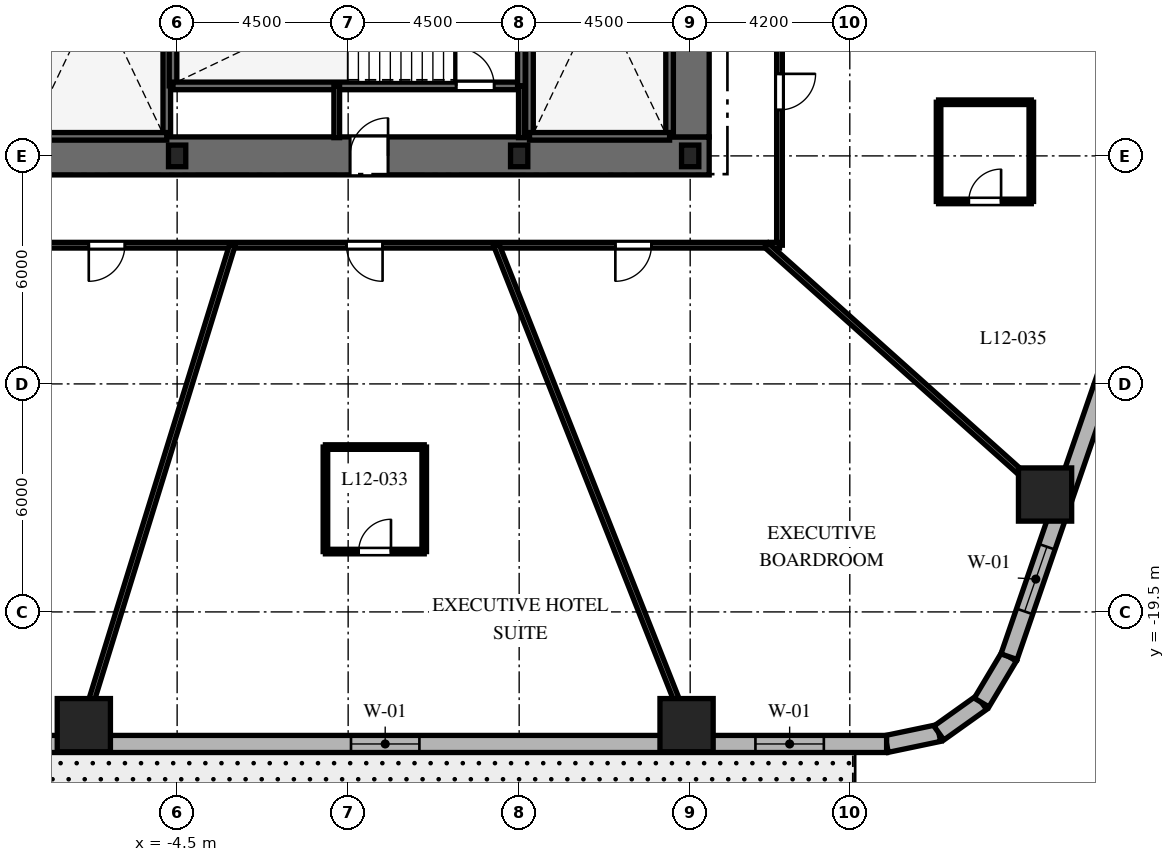
"""IFC4 building model, lengths in metres.
Left out: names, types, materials, properties, quantities, classifications, styles, units other than length and angle.
Written with IfcOpenShell. Run it as: python <this file> out.ifc"""

import sys

from ifc_helpers import new_model, si_unit, direction, frame, frame_2d, origin, origin_2d, place, context, subcontext, project, spatial, rectangle, i_section, extrude, element, fill, save


model = new_model("IFC4")
c1 = context("Model", 3, precision=1e-05, world=origin(), true_north=direction((0.0, 1.0)))
c2 = subcontext(c1, "Body", "Model", "MODEL_VIEW")
j1 = project(units=[si_unit("LENGTHUNIT", "METRE"), si_unit("PLANEANGLEUNIT", "RADIAN")], contexts=[c1])
p1 = place(None, origin())
s1 = spatial("IfcSite", under=j1, at=p1, CompositionType="ELEMENT")
p2 = place(p1, origin())
s2 = spatial("IfcBuilding", under=s1, at=p2, CompositionType="ELEMENT")
p3 = place(p2, frame((0.0, 0.0, 56.4)))
s3 = spatial("IfcBuildingStorey", under=s2, at=p3, CompositionType="ELEMENT", Elevation=56.4)
p4 = place(p3, frame((-9.5, -7.5, 0.0), z_axis=(0.0, 0.0, 1.0), x_axis=(1.0, 0.0, 0.0)))
e1 = element("IfcWall", 1, at=p4, inside=s3, PredefinedType="SHEAR", context=c2, shape_type="SweptSolid", body=[
    extrude(rectangle(XDim=19.0, YDim=1.0, at=frame_2d((9.5, 0.0))), origin(), (0.0, 0.0, 1.0), 3.7),
])
p5 = place(p4, frame((9.55, 0.0, 0.0)))
e2 = element("IfcOpeningElement", 2, at=p5, cuts=e1, PredefinedType="OPENING", context=c2, shape_type="SweptSolid", body=[
    extrude(rectangle(XDim=1.0, YDim=2.15, at=frame_2d((0.5, 1.075))), frame((0.0, 0.51, 0.0), z_axis=(0.0, -1.0, 0.0), x_axis=(1.0, 0.0, 0.0)), (0.0, 0.0, 1.0), 1.02),
])
p6 = place(p3, frame((9.0, -7.0, 0.0), z_axis=(0.0, 0.0, 1.0), x_axis=(0.0, 1.0, 0.0)))
e3 = element("IfcWall", 3, at=p6, inside=s3, PredefinedType="SHEAR", context=c2, shape_type="SweptSolid", body=[
    extrude(rectangle(XDim=14.0, YDim=1.0, at=frame_2d((7.0, 0.0))), origin(), (0.0, 0.0, 1.0), 3.7),
])
p7 = place(p6, frame((10.125, 0.0, 0.0)))
e4 = element("IfcOpeningElement", 4, at=p7, cuts=e3, PredefinedType="OPENING", context=c2, shape_type="SweptSolid", body=[
    extrude(rectangle(XDim=1.05, YDim=2.15, at=frame_2d((0.525, 1.075))), frame((0.0, 0.51, 0.0), z_axis=(0.0, -1.0, 0.0), x_axis=(1.0, 0.0, 0.0)), (0.0, 0.0, 1.0), 1.02),
])
p8 = place(p3, frame((-4.772, -6.985, 0.0), z_axis=(0.0, 0.0, 1.0), x_axis=(0.0, 1.0, 0.0)))
e5 = element("IfcWall", 5, at=p8, inside=s3, PredefinedType="SHEAR", context=c2, shape_type="SweptSolid", body=[
    extrude(rectangle(XDim=9.143, YDim=0.2, at=frame_2d((4.572, 0.0))), origin(), (0.0, 0.0, 1.0), 3.7),
])
p9 = place(p3, frame((-8.458, -6.985, 0.0), z_axis=(0.0, 0.0, 1.0), x_axis=(1.0, 0.0, 0.0)))
e6 = element("IfcWall", 6, at=p9, inside=s3, PredefinedType="SHEAR", context=c2, shape_type="SweptSolid", body=[
    extrude(rectangle(XDim=3.686, YDim=0.2, at=frame_2d((1.843, 0.0))), origin(), (0.0, 0.0, 1.0), 3.7),
])
for number, where, z_axis, x_axis in (
    (7, (4.772, -6.985, 0.0), (0.0, 0.0, 1.0), (0.0, 1.0, 0.0)),
    (8, (8.458, -6.985, 0.0), (0.0, 0.0, 1.0), (0.0, 1.0, 0.0)),
):
    element("IfcWall", number, at=place(p3, frame(where, z_axis=z_axis, x_axis=x_axis)), inside=s3, PredefinedType="SHEAR", context=c2, shape_type="SweptSolid", body=[
        extrude(rectangle(XDim=9.143, YDim=0.2, at=frame_2d((4.572, 0.0))), origin(), (0.0, 0.0, 1.0), 3.7),
    ])
for number, where, z_axis, x_axis in (
    (9, (4.772, -6.985, 0.0), (0.0, 0.0, 1.0), (1.0, 0.0, 0.0)),
    (10, (-4.608, -5.658, 0.0), (0.0, 0.0, 1.0), (0.0, 1.0, 0.0)),
):
    element("IfcWall", number, at=place(p3, frame(where, z_axis=z_axis, x_axis=x_axis)), inside=s3, PredefinedType="SHEAR", context=c2, shape_type="SweptSolid", body=[
        extrude(rectangle(XDim=3.686, YDim=0.2, at=frame_2d((1.843, 0.0))), origin(), (0.0, 0.0, 1.0), 3.7),
    ])
p10 = place(p3, frame((-4.608, -5.658, 0.0), z_axis=(0.0, 0.0, 1.0), x_axis=(1.0, 0.0, 0.0)))
e11 = element("IfcWall", 11, at=p10, inside=s3, PredefinedType="SHEAR", context=c2, shape_type="SweptSolid", body=[
    extrude(rectangle(XDim=9.166, YDim=0.2, at=frame_2d((4.583, 0.0))), origin(), (0.0, 0.0, 1.0), 3.7),
])
p11 = place(p10, frame((7.45, 0.0, 0.0)))
e12 = element("IfcOpeningElement", 12, at=p11, cuts=e11, PredefinedType="OPENING", context=c2, shape_type="SweptSolid", body=[
    extrude(rectangle(XDim=1.0, YDim=2.15, at=frame_2d((0.5, 1.075))), frame((0.0, 0.11, 0.0), z_axis=(0.0, -1.0, 0.0), x_axis=(1.0, 0.0, 0.0)), (0.0, 0.0, 1.0), 0.22),
])
p12 = place(p3, frame((4.558, -5.658, 0.0), z_axis=(0.0, 0.0, 1.0), x_axis=(0.0, 1.0, 0.0)))
e13 = element("IfcWall", 13, at=p12, inside=s3, PredefinedType="SHEAR", context=c2, shape_type="SweptSolid", body=[
    extrude(rectangle(XDim=3.686, YDim=0.2, at=frame_2d((1.843, 0.0))), origin(), (0.0, 0.0, 1.0), 3.7),
])
for number, where, z_axis, x_axis in (
    (14, (-4.5, -7.5, 0.0), (0.0, 0.0, 1.0), (1.0, 0.0, 0.0)),
    (15, (4.5, -7.5, 0.0), (0.0, 0.0, 1.0), (1.0, 0.0, 0.0)),
    (16, (9.0, -7.5, 0.0), (0.0, 0.0, 1.0), (1.0, 0.0, 0.0)),
):
    element("IfcColumn", number, at=place(p3, frame(where, z_axis=z_axis, x_axis=x_axis)), inside=s3, PredefinedType="COLUMN", context=c2, shape_type="SweptSolid", body=[
        extrude(i_section(OverallWidth=0.454, OverallDepth=0.569, WebThickness=0.078, FlangeThickness=0.125, at=origin_2d()), origin(), (0.0, 0.0, 1.0), 3.7),
    ])
for number, where, z_axis, x_axis in (
    (17, (-6.955, -22.48, 0.0), (0.0, 0.0, 1.0), (1.0, 0.0, 0.0)),
    (18, (8.905, -22.48, 0.0), (0.0, 0.0, 1.0), (1.0, 0.0, 0.0)),
    (19, (18.338, -16.411, 0.0), (0.0, 0.0, 1.0), (1.0, 0.0, 0.0)),
):
    element("IfcColumn", number, at=place(p3, frame(where, z_axis=z_axis, x_axis=x_axis)), inside=s3, PredefinedType="COLUMN", context=c2, shape_type="SweptSolid", body=[
        extrude(rectangle(XDim=1.4, YDim=1.4, at=origin_2d()), origin(), (0.0, 0.0, 1.0), 3.7),
    ])
p13 = place(p3, frame((14.168, -22.975, 0.0), z_axis=(0.0, 0.0, 1.0), x_axis=(0.978770371074, 0.204959900243, 0.0)))
e20 = element("IfcWall", 20, at=p13, inside=s3, PredefinedType="SOLIDWALL", context=c2, shape_type="SweptSolid", body=[
    extrude(rectangle(XDim=1.406, YDim=0.45, at=frame_2d((0.703, 0.0))), origin(), (0.0, 0.0, 1.0), 3.4),
])
p14 = place(p3, frame((15.544, -22.687, 0.0), z_axis=(0.0, 0.0, 1.0), x_axis=(0.814210854316, 0.580569276412, 0.0)))
e21 = element("IfcWall", 21, at=p14, inside=s3, PredefinedType="SOLIDWALL", context=c2, shape_type="SweptSolid", body=[
    extrude(rectangle(XDim=1.381, YDim=0.45, at=frame_2d((0.691, 0.0))), origin(), (0.0, 0.0, 1.0), 3.4),
])
p15 = place(p3, frame((16.669, -21.885, 0.0), z_axis=(0.0, 0.0, 1.0), x_axis=(0.512936712947, 0.858426425799, 0.0)))
e22 = element("IfcWall", 22, at=p15, inside=s3, PredefinedType="SOLIDWALL", context=c2, shape_type="SweptSolid", body=[
    extrude(rectangle(XDim=1.406, YDim=0.45, at=frame_2d((0.703, 0.0))), origin(), (0.0, 0.0, 1.0), 3.4),
])
p16 = place(p3, frame((-12.221, -22.975, 0.0), z_axis=(0.0, 0.0, 1.0), x_axis=(1.0, 0.0, 0.0)))
e23 = element("IfcWall", 23, at=p16, inside=s3, PredefinedType="SOLIDWALL", context=c2, shape_type="SweptSolid", body=[
    extrude(rectangle(XDim=26.389, YDim=0.45, at=frame_2d((13.195, 0.0))), origin(), (0.0, 0.0, 1.0), 3.4),
])
p17 = place(p16, frame((2.799, 0.0, 0.0)))
e24 = element("IfcOpeningElement", 24, at=p17, cuts=e23, PredefinedType="OPENING", context=c2, shape_type="SweptSolid", body=[
    extrude(rectangle(XDim=1.0, YDim=2.15, at=frame_2d((0.5, 1.075))), frame((0.0, 0.235, 0.0), z_axis=(0.0, -1.0, 0.0), x_axis=(1.0, 0.0, 0.0)), (0.0, 0.0, 1.0), 0.47),
])
p18 = place(p16, frame((12.296, 0.0, 0.8)))
e25 = element("IfcOpeningElement", 25, at=p18, cuts=e23, PredefinedType="OPENING", context=c2, shape_type="SweptSolid", body=[
    extrude(rectangle(XDim=1.8, YDim=1.8, at=frame_2d((0.9, 0.9))), frame((0.0, 0.235, 0.0), z_axis=(0.0, -1.0, 0.0), x_axis=(1.0, 0.0, 0.0)), (0.0, 0.0, 1.0), 0.47),
])
p19 = place(p16, frame((22.938, 0.0, 0.8)))
e26 = element("IfcOpeningElement", 26, at=p19, cuts=e23, PredefinedType="OPENING", context=c2, shape_type="SweptSolid", body=[
    extrude(rectangle(XDim=1.8, YDim=1.8, at=frame_2d((0.9, 0.9))), frame((0.0, 0.235, 0.0), z_axis=(0.0, -1.0, 0.0), x_axis=(1.0, 0.0, 0.0)), (0.0, 0.0, 1.0), 0.47),
])
p20 = place(p3, frame((17.39, -20.678, 0.0), z_axis=(0.0, 0.0, 1.0), x_axis=(0.326068018294, 0.945346310854, 0.0)))
e27 = element("IfcWall", 27, at=p20, inside=s3, PredefinedType="SOLIDWALL", context=c2, shape_type="SweptSolid", body=[
    extrude(rectangle(XDim=21.793, YDim=0.45, at=frame_2d((10.896, 0.0))), origin(), (0.0, 0.0, 1.0), 3.4),
])
p21 = place(p20, frame((1.26, 0.0, 0.8)))
e28 = element("IfcOpeningElement", 28, at=p21, cuts=e27, PredefinedType="OPENING", context=c2, shape_type="SweptSolid", body=[
    extrude(rectangle(XDim=1.8, YDim=1.8, at=frame_2d((0.9, 0.9))), frame((0.0, 0.235, 0.0), z_axis=(0.0, -1.0, 0.0), x_axis=(1.0, 0.0, 0.0)), (0.0, 0.0, 1.0), 0.47),
])
p22 = place(p20, frame((9.943, 0.0, 0.8)))
e29 = element("IfcOpeningElement", 29, at=p22, cuts=e27, PredefinedType="OPENING", context=c2, shape_type="SweptSolid", body=[
    extrude(rectangle(XDim=1.8, YDim=1.8, at=frame_2d((0.9, 0.9))), frame((0.0, 0.235, 0.0), z_axis=(0.0, -1.0, 0.0), x_axis=(1.0, 0.0, 0.0)), (0.0, 0.0, 1.0), 0.47),
])
p23 = place(p20, frame((18.68, 0.0, 0.8)))
e30 = element("IfcOpeningElement", 30, at=p23, cuts=e27, PredefinedType="OPENING", context=c2, shape_type="SweptSolid", body=[
    extrude(rectangle(XDim=1.8, YDim=1.8, at=frame_2d((0.9, 0.9))), frame((0.0, 0.235, 0.0), z_axis=(0.0, -1.0, 0.0), x_axis=(1.0, 0.0, 0.0)), (0.0, 0.0, 1.0), 0.47),
])
for number, where, z_axis, x_axis in (
    (31, (-0.3, -7.02, 0.0), (0.0, 0.0, 1.0), (0.0, 1.0, 0.0)),
    (32, (4.558, -7.02, 0.0), (0.0, 0.0, 1.0), (0.0, 1.0, 0.0)),
):
    element("IfcWall", number, at=place(p3, frame(where, z_axis=z_axis, x_axis=x_axis)), inside=s3, PredefinedType="PARTITIONING", context=c2, shape_type="SweptSolid", body=[
        extrude(rectangle(XDim=1.362, YDim=0.15, at=frame_2d((0.681, 0.0))), origin(), (0.0, 0.0, 1.0), 3.4),
    ])
p24 = place(p3, frame((11.35, 9.85, 0.0), z_axis=(0.0, 0.0, 1.0), x_axis=(0.0, -1.0, 0.0)))
e33 = element("IfcWall", 33, at=p24, inside=s3, PredefinedType="PARTITIONING", context=c2, shape_type="SweptSolid", body=[
    extrude(rectangle(XDim=19.7, YDim=0.15, at=frame_2d((9.85, 0.0))), origin(), (0.0, 0.0, 1.0), 2.84),
])
p25 = place(p24, frame((4.704, 0.0, 0.0)))
e34 = element("IfcOpeningElement", 34, at=p25, cuts=e33, PredefinedType="OPENING", context=c2, shape_type="SweptSolid", body=[
    extrude(rectangle(XDim=0.95, YDim=2.03, at=frame_2d((0.475, 1.015))), frame((0.0, 0.085, 0.0), z_axis=(0.0, -1.0, 0.0), x_axis=(1.0, 0.0, 0.0)), (0.0, 0.0, 1.0), 0.17),
])
p26 = place(p24, frame((1.462, 0.0, 0.0)))
e35 = element("IfcOpeningElement", 35, at=p26, cuts=e33, PredefinedType="OPENING", context=c2, shape_type="SweptSolid", body=[
    extrude(rectangle(XDim=0.95, YDim=2.03, at=frame_2d((0.475, 1.015))), frame((0.0, 0.085, 0.0), z_axis=(0.0, -1.0, 0.0), x_axis=(1.0, 0.0, 0.0)), (0.0, 0.0, 1.0), 0.17),
])
p27 = place(p24, frame((15.191, 0.0, 0.0)))
e36 = element("IfcOpeningElement", 36, at=p27, cuts=e33, PredefinedType="OPENING", context=c2, shape_type="SweptSolid", body=[
    extrude(rectangle(XDim=0.95, YDim=2.03, at=frame_2d((0.475, 1.015))), frame((0.0, 0.085, 0.0), z_axis=(0.0, -1.0, 0.0), x_axis=(1.0, 0.0, 0.0)), (0.0, 0.0, 1.0), 0.17),
])
p28 = place(p24, frame((8.838, 0.0, 0.0)))
e37 = element("IfcOpeningElement", 37, at=p28, cuts=e33, PredefinedType="OPENING", context=c2, shape_type="SweptSolid", body=[
    extrude(rectangle(XDim=0.95, YDim=2.03, at=frame_2d((0.475, 1.015))), frame((0.0, 0.085, 0.0), z_axis=(0.0, -1.0, 0.0), x_axis=(1.0, 0.0, 0.0)), (0.0, 0.0, 1.0), 0.17),
])
p29 = place(p3, frame((11.35, -9.85, 0.0), z_axis=(0.0, 0.0, 1.0), x_axis=(-1.0, 0.0, 0.0)))
e38 = element("IfcWall", 38, at=p29, inside=s3, PredefinedType="PARTITIONING", context=c2, shape_type="SweptSolid", body=[
    extrude(rectangle(XDim=22.7, YDim=0.15, at=frame_2d((11.35, 0.0))), origin(), (0.0, 0.0, 1.0), 2.84),
])
p30 = place(p29, frame((17.225, 0.0, 0.0)))
e39 = element("IfcOpeningElement", 39, at=p30, cuts=e38, PredefinedType="OPENING", context=c2, shape_type="SweptSolid", body=[
    extrude(rectangle(XDim=0.95, YDim=2.03, at=frame_2d((0.475, 1.015))), frame((0.0, 0.085, 0.0), z_axis=(0.0, -1.0, 0.0), x_axis=(1.0, 0.0, 0.0)), (0.0, 0.0, 1.0), 0.17),
])
p31 = place(p29, frame((10.444, 0.0, 0.0)))
e40 = element("IfcOpeningElement", 40, at=p31, cuts=e38, PredefinedType="OPENING", context=c2, shape_type="SweptSolid", body=[
    extrude(rectangle(XDim=0.95, YDim=2.03, at=frame_2d((0.475, 1.015))), frame((0.0, 0.085, 0.0), z_axis=(0.0, -1.0, 0.0), x_axis=(1.0, 0.0, 0.0)), (0.0, 0.0, 1.0), 0.17),
])
p32 = place(p29, frame((3.369, 0.0, 0.0)))
e41 = element("IfcOpeningElement", 41, at=p32, cuts=e38, PredefinedType="OPENING", context=c2, shape_type="SweptSolid", body=[
    extrude(rectangle(XDim=0.95, YDim=2.03, at=frame_2d((0.475, 1.015))), frame((0.0, 0.085, 0.0), z_axis=(0.0, -1.0, 0.0), x_axis=(1.0, 0.0, 0.0)), (0.0, 0.0, 1.0), 0.17),
])
p33 = place(p3, frame((-3.048, -9.85, 0.0), z_axis=(0.0, 0.0, 1.0), x_axis=(-0.295553992761, -0.955326037206, 0.0)))
e42 = element("IfcWall", 42, at=p33, inside=s3, PredefinedType="PARTITIONING", context=c2, shape_type="SweptSolid", body=[
    extrude(rectangle(XDim=13.739, YDim=0.15, at=frame_2d((6.869, 0.0))), origin(), (0.0, 0.0, 1.0), 2.54),
])
p34 = place(p3, frame((3.902, -9.85, 0.0), z_axis=(0.0, 0.0, 1.0), x_axis=(0.36828765711, -0.929711891728, 0.0)))
e43 = element("IfcWall", 43, at=p34, inside=s3, PredefinedType="PARTITIONING", context=c2, shape_type="SweptSolid", body=[
    extrude(rectangle(XDim=14.117, YDim=0.15, at=frame_2d((7.059, 0.0))), origin(), (0.0, 0.0, 1.0), 2.54),
])
p35 = place(p3, frame((11.007, -9.85, 0.0), z_axis=(0.0, 0.0, 1.0), x_axis=(0.745177305978, -0.666866390407, 0.0)))
e44 = element("IfcWall", 44, at=p35, inside=s3, PredefinedType="PARTITIONING", context=c2, shape_type="SweptSolid", body=[
    extrude(rectangle(XDim=10.375, YDim=0.15, at=frame_2d((5.188, 0.0))), origin(), (0.0, 0.0, 1.0), 2.54),
])
p36 = place(p3, frame((-0.598, -17.912, 0.0), z_axis=(0.0, 0.0, 1.0), x_axis=(1.0, 0.0, 0.0)))
e45 = element("IfcWall", 45, at=p36, inside=s3, PredefinedType="PARTITIONING", context=c2, shape_type="SweptSolid", body=[
    extrude(rectangle(XDim=2.6, YDim=0.12, at=frame_2d((1.3, 0.0))), origin(), (0.0, 0.0, 1.0), 3.4),
])
p37 = place(p36, frame((0.875, 0.0, 0.0)))
e46 = element("IfcOpeningElement", 46, at=p37, cuts=e45, PredefinedType="OPENING", context=c2, shape_type="SweptSolid", body=[
    extrude(rectangle(XDim=0.85, YDim=2.03, at=frame_2d((0.425, 1.015))), frame((0.0, 0.07, 0.0), z_axis=(0.0, -1.0, 0.0), x_axis=(1.0, 0.0, 0.0)), (0.0, 0.0, 1.0), 0.14),
])
p38 = place(p3, frame((2.002, -17.912, 0.0), z_axis=(0.0, 0.0, 1.0), x_axis=(0.0, 1.0, 0.0)))
e47 = element("IfcWall", 47, at=p38, inside=s3, PredefinedType="PARTITIONING", context=c2, shape_type="SweptSolid", body=[
    extrude(rectangle(XDim=2.75, YDim=0.12, at=frame_2d((1.375, 0.0))), origin(), (0.0, 0.0, 1.0), 2.841),
])
p39 = place(p3, frame((2.002, -15.162, 0.0), z_axis=(0.0, 0.0, 1.0), x_axis=(-1.0, 0.0, 0.0)))
e48 = element("IfcWall", 48, at=p39, inside=s3, PredefinedType="PARTITIONING", context=c2, shape_type="SweptSolid", body=[
    extrude(rectangle(XDim=2.6, YDim=0.12, at=frame_2d((1.3, 0.0))), origin(), (0.0, 0.0, 1.0), 3.4),
])
p40 = place(p3, frame((-0.598, -15.162, 0.0), z_axis=(0.0, 0.0, 1.0), x_axis=(0.0, -1.0, 0.0)))
e49 = element("IfcWall", 49, at=p40, inside=s3, PredefinedType="PARTITIONING", context=c2, shape_type="SweptSolid", body=[
    extrude(rectangle(XDim=2.75, YDim=0.12, at=frame_2d((1.375, 0.0))), origin(), (0.0, 0.0, 1.0), 2.841),
])
p41 = place(p3, frame((15.536, -8.698, 0.0), z_axis=(0.0, 0.0, 1.0), x_axis=(1.0, 0.0, 0.0)))
e50 = element("IfcWall", 50, at=p41, inside=s3, PredefinedType="PARTITIONING", context=c2, shape_type="SweptSolid", body=[
    extrude(rectangle(XDim=2.44, YDim=0.12, at=frame_2d((1.22, 0.0))), origin(), (0.0, 0.0, 1.0), 2.972),
])
p42 = place(p41, frame((0.795, 0.0, 0.0)))
e51 = element("IfcOpeningElement", 51, at=p42, cuts=e50, PredefinedType="OPENING", context=c2, shape_type="SweptSolid", body=[
    extrude(rectangle(XDim=0.85, YDim=2.03, at=frame_2d((0.425, 1.015))), frame((0.0, 0.07, 0.0), z_axis=(0.0, -1.0, 0.0), x_axis=(1.0, 0.0, 0.0)), (0.0, 0.0, 1.0), 0.14),
])
p43 = place(p3, frame((17.976, -8.698, 0.0), z_axis=(0.0, 0.0, 1.0), x_axis=(0.0, 1.0, 0.0)))
e52 = element("IfcWall", 52, at=p43, inside=s3, PredefinedType="PARTITIONING", context=c2, shape_type="SweptSolid", body=[
    extrude(rectangle(XDim=2.61, YDim=0.12, at=frame_2d((1.305, 0.0))), origin(), (0.0, 0.0, 1.0), 2.972),
])
p44 = place(p3, frame((17.976, -6.088, 0.0), z_axis=(0.0, 0.0, 1.0), x_axis=(-1.0, 0.0, 0.0)))
e53 = element("IfcWall", 53, at=p44, inside=s3, PredefinedType="PARTITIONING", context=c2, shape_type="SweptSolid", body=[
    extrude(rectangle(XDim=2.44, YDim=0.12, at=frame_2d((1.22, 0.0))), origin(), (0.0, 0.0, 1.0), 2.972),
])
p45 = place(p3, frame((15.536, -6.088, 0.0), z_axis=(0.0, 0.0, 1.0), x_axis=(0.0, -1.0, 0.0)))
e54 = element("IfcWall", 54, at=p45, inside=s3, PredefinedType="PARTITIONING", context=c2, shape_type="SweptSolid", body=[
    extrude(rectangle(XDim=2.61, YDim=0.12, at=frame_2d((1.305, 0.0))), origin(), (0.0, 0.0, 1.0), 3.4),
])
p46 = place(p18, origin())
e55 = element("IfcWindow", 55, at=p46, inside=s3, PartitioningType="SINGLE_PANEL", PredefinedType="WINDOW", context=c2, shape_type="SweptSolid", body=[
    extrude(rectangle(XDim=1.8, YDim=1.8, at=frame_2d((0.9, 0.9))), frame((0.0, 0.03, 0.0), z_axis=(0.0, -1.0, 0.0), x_axis=(1.0, 0.0, 0.0)), (0.0, 0.0, 1.0), 0.06),
])
fill(e25, e55)
p47 = place(p19, origin())
e56 = element("IfcWindow", 56, at=p47, inside=s3, PartitioningType="SINGLE_PANEL", PredefinedType="WINDOW", context=c2, shape_type="SweptSolid", body=[
    extrude(rectangle(XDim=1.8, YDim=1.8, at=frame_2d((0.9, 0.9))), frame((0.0, 0.03, 0.0), z_axis=(0.0, -1.0, 0.0), x_axis=(1.0, 0.0, 0.0)), (0.0, 0.0, 1.0), 0.06),
])
fill(e26, e56)
p48 = place(p21, origin())
e57 = element("IfcWindow", 57, at=p48, inside=s3, PartitioningType="SINGLE_PANEL", PredefinedType="WINDOW", context=c2, shape_type="SweptSolid", body=[
    extrude(rectangle(XDim=1.8, YDim=1.8, at=frame_2d((0.9, 0.9))), frame((0.0, 0.03, 0.0), z_axis=(0.0, -1.0, 0.0), x_axis=(1.0, 0.0, 0.0)), (0.0, 0.0, 1.0), 0.06),
])
fill(e28, e57)
p49 = place(p11, origin())
e58 = element("IfcDoor", 58, at=p49, inside=s3, OperationType="SINGLE_SWING_LEFT", PredefinedType="DOOR", context=c2, shape_type="SweptSolid", body=[
    extrude(rectangle(XDim=1.0, YDim=2.15, at=frame_2d((0.5, 1.075))), frame((0.0, 0.025, 0.0), z_axis=(0.0, -1.0, 0.0), x_axis=(1.0, 0.0, 0.0)), (0.0, 0.0, 1.0), 0.05),
])
fill(e12, e58)
p50 = place(p5, origin())
e59 = element("IfcDoor", 59, at=p50, inside=s3, OperationType="SINGLE_SWING_RIGHT", PredefinedType="DOOR", context=c2, shape_type="SweptSolid", body=[
    extrude(rectangle(XDim=1.0, YDim=2.15, at=frame_2d((0.5, 1.075))), frame((0.0, 0.025, 0.0), z_axis=(0.0, -1.0, 0.0), x_axis=(1.0, 0.0, 0.0)), (0.0, 0.0, 1.0), 0.05),
])
fill(e2, e59)
p51 = place(p30, origin())
e60 = element("IfcDoor", 60, at=p51, inside=s3, OperationType="SINGLE_SWING_RIGHT", PredefinedType="DOOR", context=c2, shape_type="SweptSolid", body=[
    extrude(rectangle(XDim=0.95, YDim=2.03, at=frame_2d((0.475, 1.015))), frame((0.0, 0.025, 0.0), z_axis=(0.0, -1.0, 0.0), x_axis=(1.0, 0.0, 0.0)), (0.0, 0.0, 1.0), 0.05),
])
fill(e39, e60)
p52 = place(p31, origin())
e61 = element("IfcDoor", 61, at=p52, inside=s3, OperationType="SINGLE_SWING_LEFT", PredefinedType="DOOR", context=c2, shape_type="SweptSolid", body=[
    extrude(rectangle(XDim=0.95, YDim=2.03, at=frame_2d((0.475, 1.015))), frame((0.0, 0.025, 0.0), z_axis=(0.0, -1.0, 0.0), x_axis=(1.0, 0.0, 0.0)), (0.0, 0.0, 1.0), 0.05),
])
fill(e40, e61)
p53 = place(p37, origin())
e62 = element("IfcDoor", 62, at=p53, inside=s3, OperationType="SINGLE_SWING_RIGHT", PredefinedType="DOOR", context=c2, shape_type="SweptSolid", body=[
    extrude(rectangle(XDim=0.85, YDim=2.03, at=frame_2d((0.425, 1.015))), frame((0.0, 0.025, 0.0), z_axis=(0.0, -1.0, 0.0), x_axis=(1.0, 0.0, 0.0)), (0.0, 0.0, 1.0), 0.05),
])
fill(e46, e62)
p54 = place(p32, origin())
e63 = element("IfcDoor", 63, at=p54, inside=s3, OperationType="SINGLE_SWING_RIGHT", PredefinedType="DOOR", context=c2, shape_type="SweptSolid", body=[
    extrude(rectangle(XDim=0.95, YDim=2.03, at=frame_2d((0.475, 1.015))), frame((0.0, 0.025, 0.0), z_axis=(0.0, -1.0, 0.0), x_axis=(1.0, 0.0, 0.0)), (0.0, 0.0, 1.0), 0.05),
])
fill(e41, e63)
p55 = place(p27, origin())
e64 = element("IfcDoor", 64, at=p55, inside=s3, OperationType="SINGLE_SWING_LEFT", PredefinedType="DOOR", context=c2, shape_type="SweptSolid", body=[
    extrude(rectangle(XDim=0.95, YDim=2.03, at=frame_2d((0.475, 1.015))), frame((0.0, 0.025, 0.0), z_axis=(0.0, -1.0, 0.0), x_axis=(1.0, 0.0, 0.0)), (0.0, 0.0, 1.0), 0.05),
])
fill(e36, e64)
p56 = place(p42, origin())
e65 = element("IfcDoor", 65, at=p56, inside=s3, OperationType="SINGLE_SWING_RIGHT", PredefinedType="DOOR", context=c2, shape_type="SweptSolid", body=[
    extrude(rectangle(XDim=0.85, YDim=2.03, at=frame_2d((0.425, 1.015))), frame((0.0, 0.025, 0.0), z_axis=(0.0, -1.0, 0.0), x_axis=(1.0, 0.0, 0.0)), (0.0, 0.0, 1.0), 0.05),
])
fill(e51, e65)
save(model, sys.argv[1])
